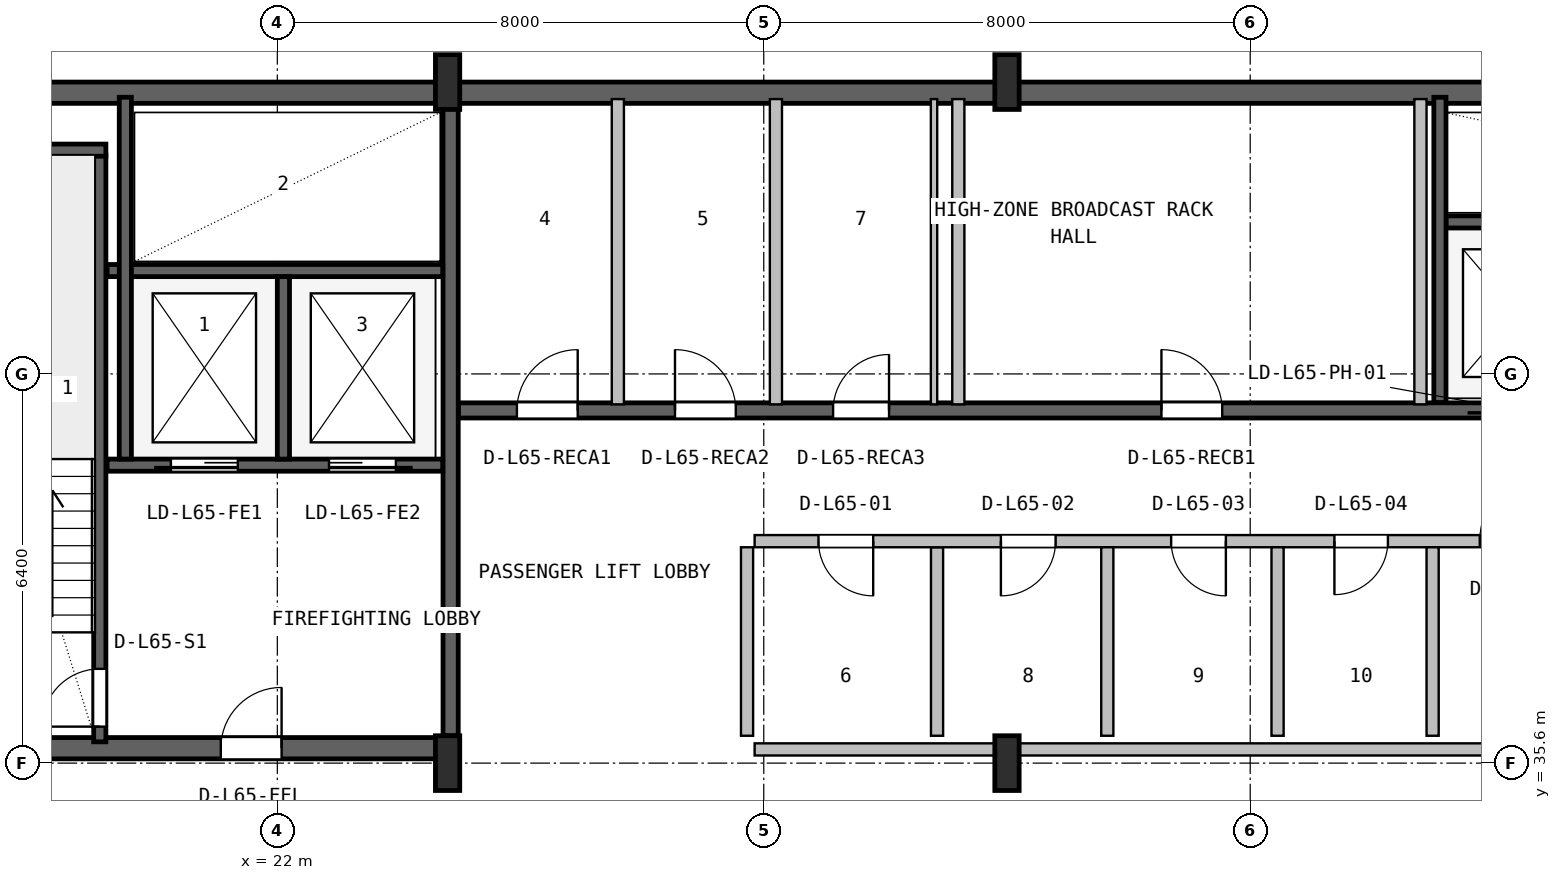
"""IFC4 building model, lengths in metres.
Left out: names, types, materials, properties, quantities, classifications, styles, units other than length and angle.
Written with IfcOpenShell. Run it as: python <this file> out.ifc"""

import sys

from ifc_helpers import new_model, si_unit, direction, frame, frame_2d, origin, origin_2d, place, context, subcontext, project, spatial, rectangle, i_section, extrude, source, transform, mapped, element, fill, save


model = new_model("IFC4")
c1 = context("Model", 3, precision=1e-05, world=origin(), true_north=direction((0.0, 1.0)))
c2 = subcontext(c1, "Body", "Model", "MODEL_VIEW")
j1 = project(units=[si_unit("LENGTHUNIT", "METRE"), si_unit("PLANEANGLEUNIT", "RADIAN")], contexts=[c1])
p1 = place(None, origin())
s1 = spatial("IfcSite", under=j1, at=p1, CompositionType="ELEMENT")
p2 = place(p1, origin())
s2 = spatial("IfcBuilding", under=s1, at=p2, CompositionType="ELEMENT")
p3 = place(p2, frame((0.0, 0.0, 262.2)))
s3 = spatial("IfcBuildingStorey", under=s2, at=p3, CompositionType="ELEMENT", Elevation=262.2)
p4 = place(p3, frame((15.325, 46.625, 0.0), z_axis=(0.0, 0.0, 1.0), x_axis=(1.0, 0.0, 0.0)))
e1 = element("IfcWall", 1, at=p4, inside=s3, PredefinedType="SHEAR", context=c2, shape_type="SweptSolid", body=[
    extrude(rectangle(XDim=37.35, YDim=0.35, at=frame_2d((18.675, 0.0))), origin(), (0.0, 0.0, 1.0), 3.55),
])
p5 = place(p3, frame((15.67, 35.845, 0.0), z_axis=(0.0, 0.0, 1.0), x_axis=(1.0, 0.0, 0.0)))
e2 = element("IfcWall", 2, at=p5, inside=s3, PredefinedType="SHEAR", context=c2, shape_type="SweptSolid", body=[
    extrude(rectangle(XDim=9.13, YDim=0.35, at=frame_2d((4.565, 0.0))), origin(), (0.0, 0.0, 1.0), 3.55),
])
p6 = place(p5, frame((5.4, 0.0, 0.0)))
e3 = element("IfcOpeningElement", 3, at=p6, cuts=e2, PredefinedType="OPENING", context=c2, shape_type="SweptSolid", body=[
    extrude(rectangle(XDim=1.0, YDim=2.1, at=frame_2d((0.5, 1.05))), frame((0.0, 0.185, 0.0), z_axis=(0.0, -1.0, 0.0), x_axis=(1.0, 0.0, 0.0)), (0.0, 0.0, 1.0), 0.37),
])
m1 = source(origin(), c2, "Body", "SweptSolid", [
    extrude(i_section(OverallWidth=0.4, OverallDepth=0.9, WebThickness=0.016, FlangeThickness=0.028, FilletRadius=0.016, at=origin_2d()), origin(), (0.0, 0.0, 1.0), 3.8),
])
for number, where, z_axis, x_axis in (
    (4, (24.8, 35.6, 0.0), (0.0, 0.0, 1.0), (1.0, 0.0, 0.0)),
    (5, (24.8, 46.8, 0.0), (0.0, 0.0, 1.0), (1.0, 0.0, 0.0)),
    (6, (34.0, 35.6, 0.0), (0.0, 0.0, 1.0), (1.0, 0.0, 0.0)),
    (7, (34.0, 46.8, 0.0), (0.0, 0.0, 1.0), (1.0, 0.0, 0.0)),
):
    element("IfcColumn", number, at=place(p3, frame(where, z_axis=z_axis, x_axis=x_axis)), inside=s3, PredefinedType="COLUMN", context=c2, shape_type="MappedRepresentation", body=[
        mapped(m1, transform((0.0, 0.0, 0.0), x_axis=(1.0, 0.0, 0.0), y_axis=(0.0, 1.0, 0.0), z_axis=(0.0, 0.0, 1.0), scale=1.0)),
    ])
p7 = place(p3, frame((19.08, 35.95, 0.0), z_axis=(0.0, 0.0, 1.0), x_axis=(0.0, 1.0, 0.0)))
e8 = element("IfcWall", 8, at=p7, inside=s3, PredefinedType="SHEAR", context=c2, shape_type="SweptSolid", body=[
    extrude(rectangle(XDim=9.65, YDim=0.2, at=frame_2d((4.825, 0.0))), origin(), (0.0, 0.0, 1.0), 3.55),
])
p8 = place(p7, frame((0.25, 0.0, 0.0)))
e9 = element("IfcOpeningElement", 9, at=p8, cuts=e8, PredefinedType="OPENING", context=c2, shape_type="SweptSolid", body=[
    extrude(rectangle(XDim=0.95, YDim=2.1, at=frame_2d((0.475, 1.05))), frame((0.0, 0.11, 0.0), z_axis=(0.0, -1.0, 0.0), x_axis=(1.0, 0.0, 0.0)), (0.0, 0.0, 1.0), 0.22),
])
p9 = place(p3, frame((15.95, 45.68, 0.0), z_axis=(0.0, 0.0, 1.0), x_axis=(1.0, 0.0, 0.0)))
e10 = element("IfcWall", 10, at=p9, inside=s3, PredefinedType="SHEAR", context=c2, shape_type="SweptSolid", body=[
    extrude(rectangle(XDim=3.23, YDim=0.2, at=frame_2d((1.615, 0.0))), origin(), (0.0, 0.0, 1.0), 3.55),
])
p10 = place(p3, frame((24.85, 36.05, 0.0), z_axis=(0.0, 0.0, 1.0), x_axis=(0.0, 1.0, 0.0)))
e11 = element("IfcWall", 11, at=p10, inside=s3, PredefinedType="SHEAR", context=c2, shape_type="SweptSolid", body=[
    extrude(rectangle(XDim=10.45, YDim=0.25, at=frame_2d((5.225, 0.0))), origin(), (0.0, 0.0, 1.0), 3.55),
])
p11 = place(p3, frame((19.2, 40.5, 0.0), z_axis=(0.0, 0.0, 1.0), x_axis=(1.0, 0.0, 0.0)))
e12 = element("IfcWall", 12, at=p11, inside=s3, PredefinedType="SHEAR", context=c2, shape_type="SweptSolid", body=[
    extrude(rectangle(XDim=5.52, YDim=0.2, at=frame_2d((2.76, 0.0))), origin(), (0.0, 0.0, 1.0), 3.55),
])
p12 = place(p11, frame((1.05, 0.0, 0.0)))
e13 = element("IfcOpeningElement", 13, at=p12, cuts=e12, PredefinedType="OPENING", context=c2, shape_type="SweptSolid", body=[
    extrude(rectangle(XDim=1.1, YDim=2.18, at=frame_2d((0.55, 1.09))), frame((0.0, 0.11, 0.0), z_axis=(0.0, -1.0, 0.0), x_axis=(1.0, 0.0, 0.0)), (0.0, 0.0, 1.0), 0.22),
])
p13 = place(p11, frame((3.65, 0.0, 0.0)))
e14 = element("IfcOpeningElement", 14, at=p13, cuts=e12, PredefinedType="OPENING", context=c2, shape_type="SweptSolid", body=[
    extrude(rectangle(XDim=1.1, YDim=2.18, at=frame_2d((0.55, 1.09))), frame((0.0, 0.11, 0.0), z_axis=(0.0, -1.0, 0.0), x_axis=(1.0, 0.0, 0.0)), (0.0, 0.0, 1.0), 0.22),
])
p14 = place(p3, frame((19.2, 43.7, 0.0), z_axis=(0.0, 0.0, 1.0), x_axis=(1.0, 0.0, 0.0)))
e15 = element("IfcWall", 15, at=p14, inside=s3, PredefinedType="SHEAR", context=c2, shape_type="SweptSolid", body=[
    extrude(rectangle(XDim=5.52, YDim=0.2, at=frame_2d((2.76, 0.0))), origin(), (0.0, 0.0, 1.0), 3.55),
])
p15 = place(p3, frame((22.1, 40.6, 0.0), z_axis=(0.0, 0.0, 1.0), x_axis=(0.0, 1.0, 0.0)))
e16 = element("IfcWall", 16, at=p15, inside=s3, PredefinedType="SHEAR", context=c2, shape_type="SweptSolid", body=[
    extrude(rectangle(XDim=3.0, YDim=0.2, at=frame_2d((1.5, 0.0))), origin(), (0.0, 0.0, 1.0), 3.55),
])
p16 = place(p3, frame((19.5, 40.6, 0.0), z_axis=(0.0, 0.0, 1.0), x_axis=(0.0, 1.0, 0.0)))
e17 = element("IfcWall", 17, at=p16, inside=s3, PredefinedType="SHEAR", context=c2, shape_type="SweptSolid", body=[
    extrude(rectangle(XDim=5.95, YDim=0.2, at=frame_2d((2.975, 0.0))), origin(), (0.0, 0.0, 1.0), 3.55),
])
p17 = place(p3, frame((24.98, 41.4, 0.0), z_axis=(0.0, 0.0, 1.0), x_axis=(1.0, 0.0, 0.0)))
e18 = element("IfcWall", 18, at=p17, inside=s3, PredefinedType="SHEAR", context=c2, shape_type="SweptSolid", body=[
    extrude(rectangle(XDim=23.82, YDim=0.25, at=frame_2d((11.91, 0.0))), origin(), (0.0, 0.0, 1.0), 3.55),
])
p18 = place(p17, frame((16.87, 0.0, 0.0)))
e19 = element("IfcOpeningElement", 19, at=p18, cuts=e18, PredefinedType="OPENING", context=c2, shape_type="SweptSolid", body=[
    extrude(rectangle(XDim=1.1, YDim=2.18, at=frame_2d((0.55, 1.09))), frame((0.0, 0.135, 0.0), z_axis=(0.0, -1.0, 0.0), x_axis=(1.0, 0.0, 0.0)), (0.0, 0.0, 1.0), 0.27),
])
p19 = place(p17, frame((19.47, 0.0, 0.0)))
e20 = element("IfcOpeningElement", 20, at=p19, cuts=e18, PredefinedType="OPENING", context=c2, shape_type="SweptSolid", body=[
    extrude(rectangle(XDim=1.1, YDim=2.18, at=frame_2d((0.55, 1.09))), frame((0.0, 0.135, 0.0), z_axis=(0.0, -1.0, 0.0), x_axis=(1.0, 0.0, 0.0)), (0.0, 0.0, 1.0), 0.27),
])
p20 = place(p17, frame((22.07, 0.0, 0.0)))
e21 = element("IfcOpeningElement", 21, at=p20, cuts=e18, PredefinedType="OPENING", context=c2, shape_type="SweptSolid", body=[
    extrude(rectangle(XDim=1.1, YDim=2.18, at=frame_2d((0.55, 1.09))), frame((0.0, 0.135, 0.0), z_axis=(0.0, -1.0, 0.0), x_axis=(1.0, 0.0, 0.0)), (0.0, 0.0, 1.0), 0.27),
])
p21 = place(p17, frame((0.96, 0.0, 0.0)))
e22 = element("IfcOpeningElement", 22, at=p21, cuts=e18, PredefinedType="OPENING", context=c2, shape_type="SweptSolid", body=[
    extrude(rectangle(XDim=1.0, YDim=2.08, at=frame_2d((0.5, 1.04))), frame((0.0, 0.135, 0.0), z_axis=(0.0, -1.0, 0.0), x_axis=(1.0, 0.0, 0.0)), (0.0, 0.0, 1.0), 0.27),
])
p22 = place(p17, frame((3.56, 0.0, 0.0)))
e23 = element("IfcOpeningElement", 23, at=p22, cuts=e18, PredefinedType="OPENING", context=c2, shape_type="SweptSolid", body=[
    extrude(rectangle(XDim=1.0, YDim=2.08, at=frame_2d((0.5, 1.04))), frame((0.0, 0.135, 0.0), z_axis=(0.0, -1.0, 0.0), x_axis=(1.0, 0.0, 0.0)), (0.0, 0.0, 1.0), 0.27),
])
p23 = place(p17, frame((6.16, 0.0, 0.0)))
e24 = element("IfcOpeningElement", 24, at=p23, cuts=e18, PredefinedType="OPENING", context=c2, shape_type="SweptSolid", body=[
    extrude(rectangle(XDim=0.92, YDim=2.08, at=frame_2d((0.46, 1.04))), frame((0.0, 0.135, 0.0), z_axis=(0.0, -1.0, 0.0), x_axis=(1.0, 0.0, 0.0)), (0.0, 0.0, 1.0), 0.27),
])
p24 = place(p17, frame((11.56, 0.0, 0.0)))
e25 = element("IfcOpeningElement", 25, at=p24, cuts=e18, PredefinedType="OPENING", context=c2, shape_type="SweptSolid", body=[
    extrude(rectangle(XDim=1.0, YDim=2.08, at=frame_2d((0.5, 1.04))), frame((0.0, 0.135, 0.0), z_axis=(0.0, -1.0, 0.0), x_axis=(1.0, 0.0, 0.0)), (0.0, 0.0, 1.0), 0.27),
])
p25 = place(p3, frame((41.22, 44.5, 0.0), z_axis=(0.0, 0.0, 1.0), x_axis=(1.0, 0.0, 0.0)))
e26 = element("IfcWall", 26, at=p25, inside=s3, PredefinedType="SHEAR", context=c2, shape_type="SweptSolid", body=[
    extrude(rectangle(XDim=7.58, YDim=0.2, at=frame_2d((3.79, 0.0))), origin(), (0.0, 0.0, 1.0), 3.55),
])
p26 = place(p3, frame((41.12, 41.53, 0.0), z_axis=(0.0, 0.0, 1.0), x_axis=(0.0, 1.0, 0.0)))
e27 = element("IfcWall", 27, at=p26, inside=s3, PredefinedType="SHEAR", context=c2, shape_type="SweptSolid", body=[
    extrude(rectangle(XDim=5.02, YDim=0.2, at=frame_2d((2.51, 0.0))), origin(), (0.0, 0.0, 1.0), 3.55),
])
p27 = place(p3, frame((29.85, 35.825, 0.0), z_axis=(0.0, 0.0, 1.0), x_axis=(1.0, 0.0, 0.0)))
e28 = element("IfcWall", 28, at=p27, inside=s3, PredefinedType="SOLIDWALL", context=c2, shape_type="SweptSolid", body=[
    extrude(rectangle(XDim=13.7, YDim=0.2, at=frame_2d((6.85, 0.0))), origin(), (0.0, 0.0, 1.0), 2.575),
])
p28 = place(p3, frame((32.85, 36.05, 0.0), z_axis=(0.0, 0.0, 1.0), x_axis=(0.0, 1.0, 0.0)))
e29 = element("IfcWall", 29, at=p28, inside=s3, PredefinedType="PLUMBINGWALL", context=c2, shape_type="SweptSolid", body=[
    extrude(rectangle(XDim=3.1, YDim=0.2, at=frame_2d((1.55, 0.0))), origin(), (0.0, 0.0, 1.0), 3.53),
])
p29 = place(p3, frame((29.85, 39.25, 0.0), z_axis=(0.0, 0.0, 1.0), x_axis=(1.0, 0.0, 0.0)))
e30 = element("IfcWall", 30, at=p29, inside=s3, PredefinedType="SOLIDWALL", context=c2, shape_type="SweptSolid", body=[
    extrude(rectangle(XDim=13.7, YDim=0.2, at=frame_2d((6.85, 0.0))), origin(), (0.0, 0.0, 1.0), 3.53),
])
p30 = place(p29, frame((1.05, 0.0, 0.0)))
e31 = element("IfcOpeningElement", 31, at=p30, cuts=e30, PredefinedType="OPENING", context=c2, shape_type="SweptSolid", body=[
    extrude(rectangle(XDim=0.9, YDim=2.06, at=frame_2d((0.45, 1.03))), frame((0.0, 0.11, 0.0), z_axis=(0.0, -1.0, 0.0), x_axis=(1.0, 0.0, 0.0)), (0.0, 0.0, 1.0), 0.22),
])
p31 = place(p29, frame((4.05, 0.0, 0.0)))
e32 = element("IfcOpeningElement", 32, at=p31, cuts=e30, PredefinedType="OPENING", context=c2, shape_type="SweptSolid", body=[
    extrude(rectangle(XDim=0.9, YDim=2.06, at=frame_2d((0.45, 1.03))), frame((0.0, 0.11, 0.0), z_axis=(0.0, -1.0, 0.0), x_axis=(1.0, 0.0, 0.0)), (0.0, 0.0, 1.0), 0.22),
])
p32 = place(p29, frame((6.85, 0.0, 0.0)))
e33 = element("IfcOpeningElement", 33, at=p32, cuts=e30, PredefinedType="OPENING", context=c2, shape_type="SweptSolid", body=[
    extrude(rectangle(XDim=0.9, YDim=2.06, at=frame_2d((0.45, 1.03))), frame((0.0, 0.11, 0.0), z_axis=(0.0, -1.0, 0.0), x_axis=(1.0, 0.0, 0.0)), (0.0, 0.0, 1.0), 0.22),
])
p33 = place(p29, frame((9.535, 0.0, 0.0)))
e34 = element("IfcOpeningElement", 34, at=p33, cuts=e30, PredefinedType="OPENING", context=c2, shape_type="SweptSolid", body=[
    extrude(rectangle(XDim=0.88, YDim=2.06, at=frame_2d((0.44, 1.03))), frame((0.0, 0.11, 0.0), z_axis=(0.0, -1.0, 0.0), x_axis=(1.0, 0.0, 0.0)), (0.0, 0.0, 1.0), 0.22),
])
p34 = place(p29, frame((11.925, 0.0, 0.0)))
e35 = element("IfcOpeningElement", 35, at=p34, cuts=e30, PredefinedType="OPENING", context=c2, shape_type="SweptSolid", body=[
    extrude(rectangle(XDim=1.2, YDim=2.1, at=frame_2d((0.6, 1.05))), frame((0.0, 0.11, 0.0), z_axis=(0.0, -1.0, 0.0), x_axis=(1.0, 0.0, 0.0)), (0.0, 0.0, 1.0), 0.22),
])
for number, where, z_axis, x_axis in (
    (36, (29.725, 36.05, 0.0), (0.0, 0.0, 1.0), (0.0, 1.0, 0.0)),
    (37, (35.65, 36.05, 0.0), (0.0, 0.0, 1.0), (0.0, 1.0, 0.0)),
    (38, (38.45, 36.05, 0.0), (0.0, 0.0, 1.0), (0.0, 1.0, 0.0)),
):
    element("IfcWall", number, at=place(p3, frame(where, z_axis=z_axis, x_axis=x_axis)), inside=s3, PredefinedType="PLUMBINGWALL", context=c2, shape_type="SweptSolid", body=[
        extrude(rectangle(XDim=3.1, YDim=0.2, at=frame_2d((1.55, 0.0))), origin(), (0.0, 0.0, 1.0), 3.53),
    ])
p35 = place(p3, frame((41.0, 36.05, 0.0), z_axis=(0.0, 0.0, 1.0), x_axis=(0.0, 1.0, 0.0)))
e39 = element("IfcWall", 39, at=p35, inside=s3, PredefinedType="SOLIDWALL", context=c2, shape_type="SweptSolid", body=[
    extrude(rectangle(XDim=3.1, YDim=0.2, at=frame_2d((1.55, 0.0))), origin(), (0.0, 0.0, 1.0), 3.53),
])
for number, where, z_axis, x_axis in (
    (40, (27.6, 41.5, 0.0), (0.0, 0.0, 1.0), (0.0, 1.0, 0.0)),
    (41, (30.2, 41.5, 0.0), (0.0, 0.0, 1.0), (0.0, 1.0, 0.0)),
):
    element("IfcWall", number, at=place(p3, frame(where, z_axis=z_axis, x_axis=x_axis)), inside=s3, PredefinedType="SOLIDWALL", context=c2, shape_type="SweptSolid", body=[
        extrude(rectangle(XDim=5.02, YDim=0.2, at=frame_2d((2.51, 0.0))), origin(), (0.0, 0.0, 1.0), 3.53),
    ])
p36 = place(p3, frame((32.8, 41.5, 0.0), z_axis=(0.0, 0.0, 1.0), x_axis=(0.0, 1.0, 0.0)))
e42 = element("IfcWall", 42, at=p36, inside=s3, PredefinedType="PARTITIONING", context=c2, shape_type="SweptSolid", body=[
    extrude(rectangle(XDim=5.02, YDim=0.105, at=frame_2d((2.51, 0.0))), origin(), (0.0, 0.0, 1.0), 3.53),
])
for number, where, z_axis, x_axis in (
    (43, (40.8, 41.5, 0.0), (0.0, 0.0, 1.0), (0.0, 1.0, 0.0)),
    (44, (33.2, 41.5, 0.0), (0.0, 0.0, 1.0), (0.0, 1.0, 0.0)),
):
    element("IfcWall", number, at=place(p3, frame(where, z_axis=z_axis, x_axis=x_axis)), inside=s3, PredefinedType="SOLIDWALL", context=c2, shape_type="SweptSolid", body=[
        extrude(rectangle(XDim=5.02, YDim=0.2, at=frame_2d((2.51, 0.0))), origin(), (0.0, 0.0, 1.0), 3.53),
    ])
m2 = source(origin(), c2, "Body", "SweptSolid", [
    extrude(rectangle(XDim=0.95, YDim=2.1, at=frame_2d((0.475, 1.05))), frame((0.0, 0.025, 0.0), z_axis=(0.0, -1.0, 0.0), x_axis=(1.0, 0.0, 0.0)), (0.0, 0.0, 1.0), 0.05),
])
p37 = place(p8, origin())
e45 = element("IfcDoor", 45, at=p37, inside=s3, OperationType="SINGLE_SWING_LEFT", PredefinedType="DOOR", context=c2, shape_type="MappedRepresentation", body=[
    mapped(m2, transform((0.0, 0.0, 0.0), x_axis=(1.0, 0.0, 0.0), y_axis=(0.0, 1.0, 0.0), z_axis=(0.0, 0.0, 1.0), scale=1.0)),
])
fill(e9, e45)
m3 = source(origin(), c2, "Body", "SweptSolid", [
    extrude(rectangle(XDim=1.0, YDim=2.1, at=frame_2d((0.5, 1.05))), frame((0.0, 0.025, 0.0), z_axis=(0.0, -1.0, 0.0), x_axis=(1.0, 0.0, 0.0)), (0.0, 0.0, 1.0), 0.05),
])
p38 = place(p6, origin())
e46 = element("IfcDoor", 46, at=p38, inside=s3, OperationType="SINGLE_SWING_RIGHT", PredefinedType="DOOR", context=c2, shape_type="MappedRepresentation", body=[
    mapped(m3, transform((0.0, 0.0, 0.0), x_axis=(1.0, 0.0, 0.0), y_axis=(0.0, 1.0, 0.0), z_axis=(0.0, 0.0, 1.0), scale=1.0)),
])
fill(e3, e46)
m4 = source(origin(), c2, "Body", "SweptSolid", [
    extrude(rectangle(XDim=1.1, YDim=2.18, at=frame_2d((0.55, 1.09))), frame((0.0, 0.025, 0.0), z_axis=(0.0, -1.0, 0.0), x_axis=(1.0, 0.0, 0.0)), (0.0, 0.0, 1.0), 0.05),
])
p39 = place(p12, frame((1.1, 0.0, 0.0), z_axis=(0.0, 0.0, 1.0), x_axis=(-1.0, 0.0, 0.0)))
e47 = element("IfcDoor", 47, at=p39, inside=s3, OperationType="SLIDING_TO_LEFT", PredefinedType="DOOR", context=c2, shape_type="MappedRepresentation", body=[
    mapped(m4, transform((0.0, 0.0, 0.0), x_axis=(1.0, 0.0, 0.0), y_axis=(0.0, 1.0, 0.0), z_axis=(0.0, 0.0, 1.0), scale=1.0)),
])
fill(e13, e47)
p40 = place(p13, frame((1.1, 0.0, 0.0), z_axis=(0.0, 0.0, 1.0), x_axis=(-1.0, 0.0, 0.0)))
e48 = element("IfcDoor", 48, at=p40, inside=s3, OperationType="SLIDING_TO_RIGHT", PredefinedType="DOOR", context=c2, shape_type="MappedRepresentation", body=[
    mapped(m4, transform((0.0, 0.0, 0.0), x_axis=(1.0, 0.0, 0.0), y_axis=(0.0, 1.0, 0.0), z_axis=(0.0, 0.0, 1.0), scale=1.0)),
])
fill(e14, e48)
m5 = source(origin(), c2, "Body", "SweptSolid", [
    extrude(rectangle(XDim=1.0, YDim=2.08, at=frame_2d((0.5, 1.04))), frame((0.0, 0.025, 0.0), z_axis=(0.0, -1.0, 0.0), x_axis=(1.0, 0.0, 0.0)), (0.0, 0.0, 1.0), 0.05),
])
p41 = place(p21, origin())
e49 = element("IfcDoor", 49, at=p41, inside=s3, OperationType="SINGLE_SWING_RIGHT", PredefinedType="DOOR", context=c2, shape_type="MappedRepresentation", body=[
    mapped(m5, transform((0.0, 0.0, 0.0), x_axis=(1.0, 0.0, 0.0), y_axis=(0.0, 1.0, 0.0), z_axis=(0.0, 0.0, 1.0), scale=1.0)),
])
fill(e22, e49)
p42 = place(p22, origin())
e50 = element("IfcDoor", 50, at=p42, inside=s3, OperationType="SINGLE_SWING_LEFT", PredefinedType="DOOR", context=c2, shape_type="MappedRepresentation", body=[
    mapped(m5, transform((0.0, 0.0, 0.0), x_axis=(1.0, 0.0, 0.0), y_axis=(0.0, 1.0, 0.0), z_axis=(0.0, 0.0, 1.0), scale=1.0)),
])
fill(e23, e50)
m6 = source(origin(), c2, "Body", "SweptSolid", [
    extrude(rectangle(XDim=0.92, YDim=2.08, at=frame_2d((0.46, 1.04))), frame((0.0, 0.025, 0.0), z_axis=(0.0, -1.0, 0.0), x_axis=(1.0, 0.0, 0.0)), (0.0, 0.0, 1.0), 0.05),
])
p43 = place(p23, origin())
e51 = element("IfcDoor", 51, at=p43, inside=s3, OperationType="SINGLE_SWING_RIGHT", PredefinedType="DOOR", context=c2, shape_type="MappedRepresentation", body=[
    mapped(m6, transform((0.0, 0.0, 0.0), x_axis=(1.0, 0.0, 0.0), y_axis=(0.0, 1.0, 0.0), z_axis=(0.0, 0.0, 1.0), scale=1.0)),
])
fill(e24, e51)
p44 = place(p24, origin())
e52 = element("IfcDoor", 52, at=p44, inside=s3, OperationType="SINGLE_SWING_LEFT", PredefinedType="DOOR", context=c2, shape_type="MappedRepresentation", body=[
    mapped(m5, transform((0.0, 0.0, 0.0), x_axis=(1.0, 0.0, 0.0), y_axis=(0.0, 1.0, 0.0), z_axis=(0.0, 0.0, 1.0), scale=1.0)),
])
fill(e25, e52)
m7 = source(origin(), c2, "Body", "SweptSolid", [
    extrude(rectangle(XDim=0.9, YDim=2.06, at=frame_2d((0.45, 1.03))), frame((0.0, 0.025, 0.0), z_axis=(0.0, -1.0, 0.0), x_axis=(1.0, 0.0, 0.0)), (0.0, 0.0, 1.0), 0.05),
])
p45 = place(p30, frame((0.9, 0.0, 0.0), z_axis=(0.0, 0.0, 1.0), x_axis=(-1.0, 0.0, 0.0)))
e53 = element("IfcDoor", 53, at=p45, inside=s3, OperationType="SINGLE_SWING_RIGHT", PredefinedType="DOOR", context=c2, shape_type="MappedRepresentation", body=[
    mapped(m7, transform((0.0, 0.0, 0.0), x_axis=(1.0, 0.0, 0.0), y_axis=(0.0, 1.0, 0.0), z_axis=(0.0, 0.0, 1.0), scale=1.0)),
])
fill(e31, e53)
p46 = place(p31, frame((0.9, 0.0, 0.0), z_axis=(0.0, 0.0, 1.0), x_axis=(-1.0, 0.0, 0.0)))
e54 = element("IfcDoor", 54, at=p46, inside=s3, OperationType="SINGLE_SWING_LEFT", PredefinedType="DOOR", context=c2, shape_type="MappedRepresentation", body=[
    mapped(m7, transform((0.0, 0.0, 0.0), x_axis=(1.0, 0.0, 0.0), y_axis=(0.0, 1.0, 0.0), z_axis=(0.0, 0.0, 1.0), scale=1.0)),
])
fill(e32, e54)
p47 = place(p32, frame((0.9, 0.0, 0.0), z_axis=(0.0, 0.0, 1.0), x_axis=(-1.0, 0.0, 0.0)))
e55 = element("IfcDoor", 55, at=p47, inside=s3, OperationType="SINGLE_SWING_RIGHT", PredefinedType="DOOR", context=c2, shape_type="MappedRepresentation", body=[
    mapped(m7, transform((0.0, 0.0, 0.0), x_axis=(1.0, 0.0, 0.0), y_axis=(0.0, 1.0, 0.0), z_axis=(0.0, 0.0, 1.0), scale=1.0)),
])
fill(e33, e55)
m8 = source(origin(), c2, "Body", "SweptSolid", [
    extrude(rectangle(XDim=0.88, YDim=2.06, at=frame_2d((0.44, 1.03))), frame((0.0, 0.025, 0.0), z_axis=(0.0, -1.0, 0.0), x_axis=(1.0, 0.0, 0.0)), (0.0, 0.0, 1.0), 0.05),
])
p48 = place(p33, frame((0.88, 0.0, 0.0), z_axis=(0.0, 0.0, 1.0), x_axis=(-1.0, 0.0, 0.0)))
e56 = element("IfcDoor", 56, at=p48, inside=s3, OperationType="SINGLE_SWING_LEFT", PredefinedType="DOOR", context=c2, shape_type="MappedRepresentation", body=[
    mapped(m8, transform((0.0, 0.0, 0.0), x_axis=(1.0, 0.0, 0.0), y_axis=(0.0, 1.0, 0.0), z_axis=(0.0, 0.0, 1.0), scale=1.0)),
])
fill(e34, e56)
m9 = source(origin(), c2, "Body", "SweptSolid", [
    extrude(rectangle(XDim=1.2, YDim=2.1, at=frame_2d((0.6, 1.05))), frame((0.0, 0.025, 0.0), z_axis=(0.0, -1.0, 0.0), x_axis=(1.0, 0.0, 0.0)), (0.0, 0.0, 1.0), 0.05),
])
p49 = place(p34, origin())
e57 = element("IfcDoor", 57, at=p49, inside=s3, OperationType="SINGLE_SWING_RIGHT", PredefinedType="DOOR", context=c2, shape_type="MappedRepresentation", body=[
    mapped(m9, transform((0.0, 0.0, 0.0), x_axis=(1.0, 0.0, 0.0), y_axis=(0.0, 1.0, 0.0), z_axis=(0.0, 0.0, 1.0), scale=1.0)),
])
fill(e35, e57)
save(model, sys.argv[1])
